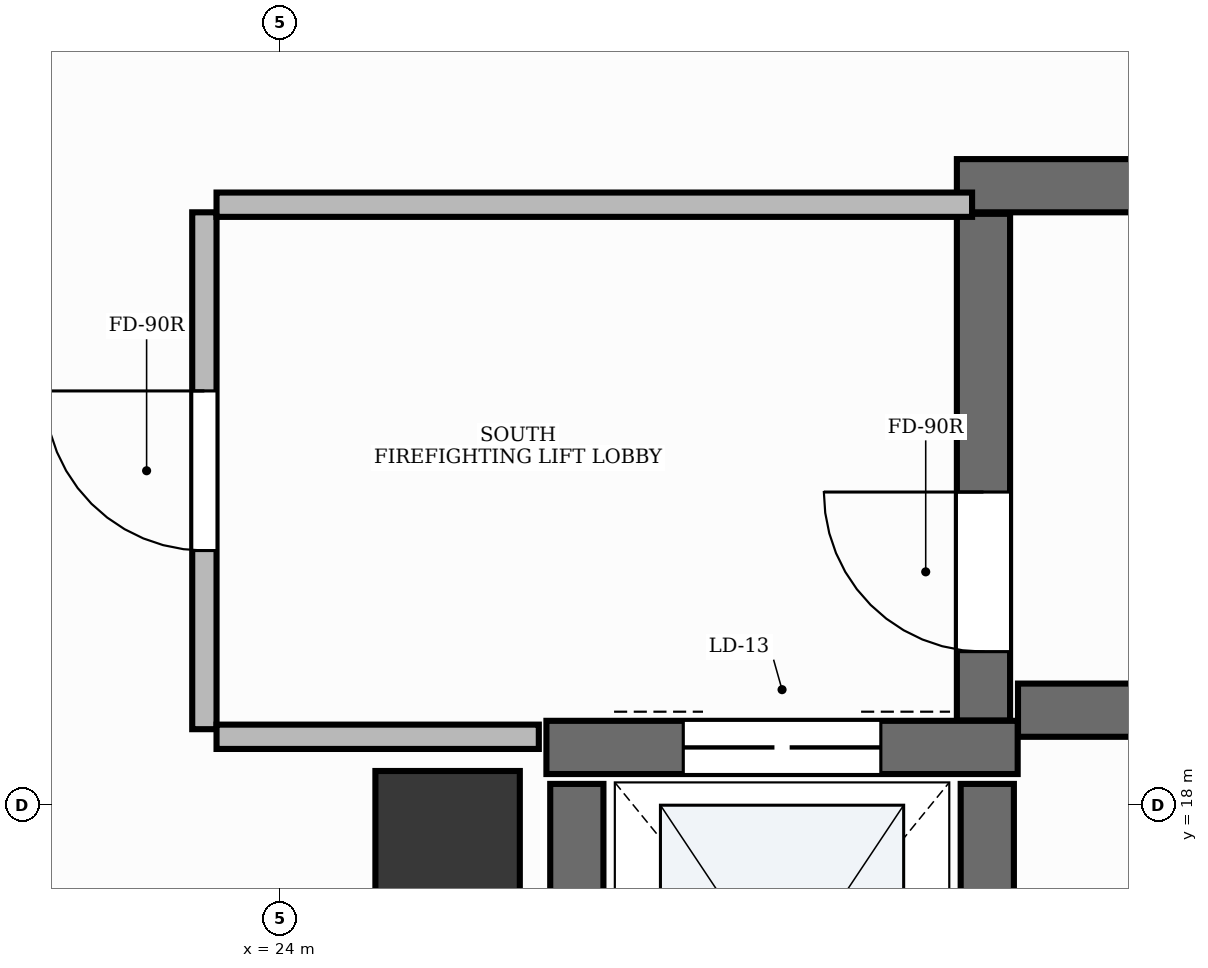
"""IFC4 building model, lengths in metres.
Left out: names, types, materials, properties, quantities, classifications, styles, units other than length and angle.
Written with IfcOpenShell. Run it as: python <this file> out.ifc"""

import sys

from ifc_helpers import new_model, si_unit, direction, frame, frame_2d, origin, origin_2d, place, context, subcontext, project, spatial, rectangle, extrude, element, fill, save


model = new_model("IFC4")
c1 = context("Model", 3, precision=1e-05, world=origin(), true_north=direction((0.0, 1.0)))
c2 = subcontext(c1, "Body", "Model", "MODEL_VIEW")
j1 = project(units=[si_unit("LENGTHUNIT", "METRE"), si_unit("PLANEANGLEUNIT", "RADIAN")], contexts=[c1])
p1 = place(None, origin())
s1 = spatial("IfcSite", under=j1, at=p1, CompositionType="ELEMENT")
p2 = place(p1, origin())
s2 = spatial("IfcBuilding", under=s1, at=p2, CompositionType="ELEMENT")
p3 = place(p2, frame((0.0, 0.0, 282.6)))
s3 = spatial("IfcBuildingStorey", under=s2, at=p3, CompositionType="ELEMENT", Elevation=282.6)
p4 = place(p3, frame((28.852, 18.625, 0.0), z_axis=(0.0, 0.0, 1.0), x_axis=(1.0, 0.0, 0.0)))
e1 = element("IfcWall", 1, at=p4, inside=s3, PredefinedType="SHEAR", context=c2, shape_type="SweptSolid", body=[
    extrude(rectangle(XDim=8.148, YDim=0.35, at=frame_2d((4.074, 0.0))), origin(), (0.0, 0.0, 1.0), 3.79),
])
p5 = place(p3, frame((28.45, 22.075, 0.0), z_axis=(0.0, 0.0, 1.0), x_axis=(1.0, 0.0, 0.0)))
e2 = element("IfcWall", 2, at=p5, inside=s3, PredefinedType="SHEAR", context=c2, shape_type="SweptSolid", body=[
    extrude(rectangle(XDim=8.55, YDim=0.35, at=frame_2d((4.275, 0.0))), origin(), (0.0, 0.0, 1.0), 3.79),
])
p6 = place(p3, frame((28.625, 18.557, 0.0), z_axis=(0.0, 0.0, 1.0), x_axis=(0.0, 1.0, 0.0)))
e3 = element("IfcWall", 3, at=p6, inside=s3, PredefinedType="SHEAR", context=c2, shape_type="SweptSolid", body=[
    extrude(rectangle(XDim=3.333, YDim=0.35, at=frame_2d((1.667, 0.0))), origin(), (0.0, 0.0, 1.0), 3.79),
])
p7 = place(p6, frame((0.453, 0.0, 0.0)))
e4 = element("IfcOpeningElement", 4, at=p7, cuts=e3, PredefinedType="OPENING", context=c2, shape_type="SweptSolid", body=[
    extrude(rectangle(XDim=1.05, YDim=2.15, at=frame_2d((0.525, 1.075))), frame((0.0, 0.19, 0.0), z_axis=(0.0, -1.0, 0.0), x_axis=(1.0, 0.0, 0.0)), (0.0, 0.0, 1.0), 0.38),
])
p8 = place(p3, frame((25.75, 18.38, 0.0), z_axis=(0.0, 0.0, 1.0), x_axis=(1.0, 0.0, 0.0)))
e5 = element("IfcWall", 5, at=p8, inside=s3, PredefinedType="SHEAR", context=c2, shape_type="SweptSolid", body=[
    extrude(rectangle(XDim=3.1, YDim=0.35, at=frame_2d((1.55, 0.0))), origin(), (0.0, 0.0, 1.0), 3.79),
])
p9 = place(p8, frame((0.9, 0.0, 0.0)))
e6 = element("IfcOpeningElement", 6, at=p9, cuts=e5, PredefinedType="OPENING", context=c2, shape_type="SweptSolid", body=[
    extrude(rectangle(XDim=1.3, YDim=2.2, at=frame_2d((0.65, 1.1))), frame((0.0, 0.19, 0.0), z_axis=(0.0, -1.0, 0.0), x_axis=(1.0, 0.0, 0.0)), (0.0, 0.0, 1.0), 0.38),
])
for number, where, z_axis, x_axis in (
    (7, (25.95, 15.44, 0.0), (0.0, 0.0, 1.0), (0.0, 1.0, 0.0)),
    (8, (28.65, 15.44, 0.0), (0.0, 0.0, 1.0), (0.0, 1.0, 0.0)),
):
    element("IfcWall", number, at=place(p3, frame(where, z_axis=z_axis, x_axis=x_axis)), inside=s3, PredefinedType="SHEAR", context=c2, shape_type="SweptSolid", body=[
        extrude(rectangle(XDim=2.7, YDim=0.35, at=frame_2d((1.35, 0.0))), origin(), (0.0, 0.0, 1.0), 3.79),
    ])
p10 = place(p3, frame((25.1, 17.75, -0.0), z_axis=(0.0, 0.0, 1.0), x_axis=(1.0, 0.0, 0.0)))
e9 = element("IfcColumn", 9, at=p10, inside=s3, PredefinedType="PILASTER", context=c2, shape_type="SweptSolid", body=[
    extrude(rectangle(XDim=0.95, YDim=0.95, at=origin_2d()), origin(), (0.0, 0.0, 1.0), 3.791),
])
p11 = place(p3, frame((23.5, 18.5, 0.0), z_axis=(0.0, 0.0, 1.0), x_axis=(0.0, 1.0, 0.0)))
e10 = element("IfcWall", 10, at=p11, inside=s3, PredefinedType="PARTITIONING", context=c2, shape_type="SweptSolid", body=[
    extrude(rectangle(XDim=3.4, YDim=0.16, at=frame_2d((1.7, 0.0))), origin(), (0.0, 0.0, 1.0), 2.8),
])
p12 = place(p11, frame((1.175, 0.0, 0.0)))
e11 = element("IfcOpeningElement", 11, at=p12, cuts=e10, PredefinedType="OPENING", context=c2, shape_type="SweptSolid", body=[
    extrude(rectangle(XDim=1.05, YDim=2.15, at=frame_2d((0.525, 1.075))), frame((0.0, 0.095, 0.0), z_axis=(0.0, -1.0, 0.0), x_axis=(1.0, 0.0, 0.0)), (0.0, 0.0, 1.0), 0.19),
])
p13 = place(p3, frame((23.58, 21.95, 0.0), z_axis=(0.0, 0.0, 1.0), x_axis=(1.0, 0.0, 0.0)))
e12 = element("IfcWall", 12, at=p13, inside=s3, PredefinedType="PARTITIONING", context=c2, shape_type="SweptSolid", body=[
    extrude(rectangle(XDim=4.97, YDim=0.16, at=frame_2d((2.485, 0.0))), origin(), (0.0, 0.0, 1.0), 2.8),
])
p14 = place(p3, frame((23.58, 18.45, 0.0), z_axis=(0.0, 0.0, 1.0), x_axis=(1.0, 0.0, 0.0)))
e13 = element("IfcWall", 13, at=p14, inside=s3, PredefinedType="PARTITIONING", context=c2, shape_type="SweptSolid", body=[
    extrude(rectangle(XDim=2.12, YDim=0.16, at=frame_2d((1.06, 0.0))), origin(), (0.0, 0.0, 1.0), 2.8),
])
p15 = place(p7, origin())
e14 = element("IfcDoor", 14, at=p15, inside=s3, OperationType="SINGLE_SWING_RIGHT", PredefinedType="DOOR", context=c2, shape_type="SweptSolid", body=[
    extrude(rectangle(XDim=1.05, YDim=2.15, at=frame_2d((0.525, 1.075))), frame((0.0, 0.025, 0.0), z_axis=(0.0, -1.0, 0.0), x_axis=(1.0, 0.0, 0.0)), (0.0, 0.0, 1.0), 0.05),
])
fill(e4, e14)
p16 = place(p9, origin())
e15 = element("IfcDoor", 15, at=p16, inside=s3, OperationType="DOUBLE_DOOR_SLIDING", PredefinedType="DOOR", context=c2, shape_type="SweptSolid", body=[
    extrude(rectangle(XDim=1.3, YDim=2.2, at=frame_2d((0.65, 1.1))), frame((0.0, 0.025, 0.0), z_axis=(0.0, -1.0, 0.0), x_axis=(1.0, 0.0, 0.0)), (0.0, 0.0, 1.0), 0.05),
])
fill(e6, e15)
p17 = place(p12, origin())
e16 = element("IfcDoor", 16, at=p17, inside=s3, OperationType="SINGLE_SWING_RIGHT", PredefinedType="DOOR", context=c2, shape_type="SweptSolid", body=[
    extrude(rectangle(XDim=1.05, YDim=2.15, at=frame_2d((0.525, 1.075))), frame((0.0, 0.025, 0.0), z_axis=(0.0, -1.0, 0.0), x_axis=(1.0, 0.0, 0.0)), (0.0, 0.0, 1.0), 0.05),
])
fill(e11, e16)
save(model, sys.argv[1])
